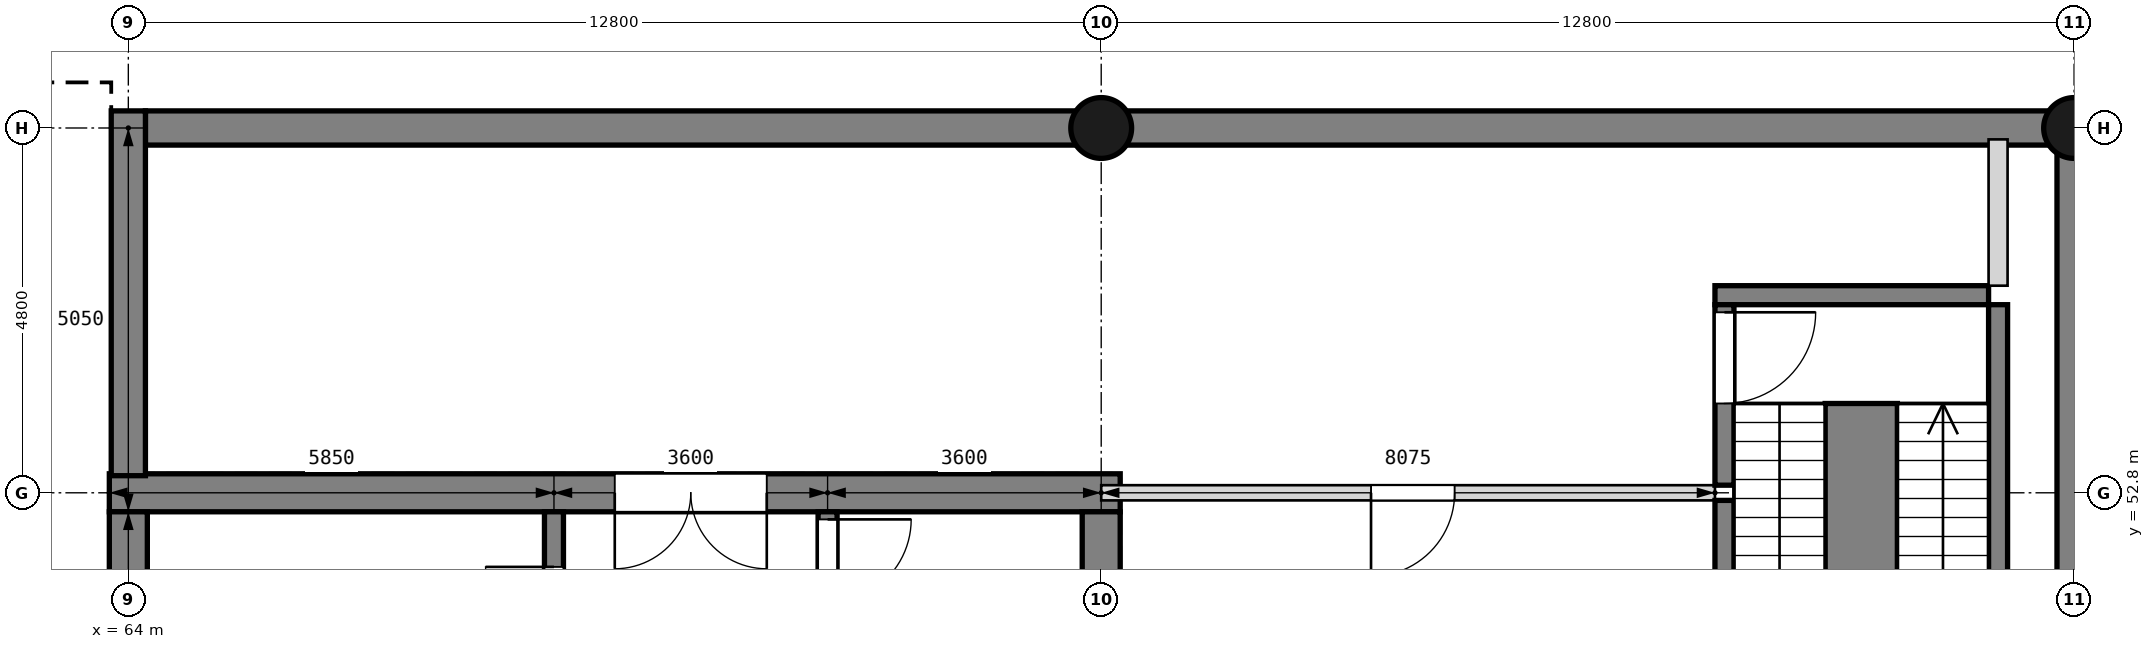
"""IFC4 building model, lengths in metres.
Left out: names, types, materials, properties, quantities, classifications, styles, units other than length and angle.
Written with IfcOpenShell. Run it as: python <this file> out.ifc"""

import sys

from ifc_helpers import new_model, si_unit, direction, frame, frame_2d, origin, origin_2d, place, context, subcontext, project, spatial, rectangle, circle, extrude, element, fill, save


model = new_model("IFC4")
c1 = context("Model", 3, precision=1e-05, world=origin(), true_north=direction((0.0, 1.0)))
c2 = subcontext(c1, "Body", "Model", "MODEL_VIEW")
j1 = project(units=[si_unit("LENGTHUNIT", "METRE"), si_unit("PLANEANGLEUNIT", "RADIAN")], contexts=[c1])
p1 = place(None, origin())
s1 = spatial("IfcSite", under=j1, at=p1, CompositionType="ELEMENT")
p2 = place(p1, origin())
s2 = spatial("IfcBuilding", under=s1, at=p2, CompositionType="ELEMENT")
p3 = place(p2, frame((0.0, 0.0, -4.8)))
s3 = spatial("IfcBuildingStorey", under=s2, at=p3, CompositionType="ELEMENT", Elevation=-4.8)
p4 = place(p3, frame((63.75, 52.8, 0.0), z_axis=(0.0, 0.0, 1.0), x_axis=(1.0, 0.0, 0.0)))
e1 = element("IfcWall", 1, at=p4, inside=s3, PredefinedType="SHEAR", context=c2, shape_type="SweptSolid", body=[
    extrude(rectangle(XDim=13.3, YDim=0.5, at=frame_2d((6.65, 0.0))), origin(), (0.0, 0.0, 1.0), 4.8),
])
p5 = place(p4, frame((6.65, 0.0, 0.0)))
e2 = element("IfcOpeningElement", 2, at=p5, cuts=e1, PredefinedType="OPENING", context=c2, shape_type="SweptSolid", body=[
    extrude(rectangle(XDim=2.0, YDim=2.1, at=frame_2d((1.0, 1.05))), frame((0.0, 0.26, 0.0), z_axis=(0.0, -1.0, 0.0), x_axis=(1.0, 0.0, 0.0)), (0.0, 0.0, 1.0), 0.52),
])
for number, where, z_axis, x_axis in (
    (3, (76.8, 33.85, 0.0), (0.0, 0.0, 1.0), (0.0, 1.0, 0.0)),
    (4, (64.0, 33.85, 0.0), (0.0, 0.0, 1.0), (0.0, 1.0, 0.0)),
):
    element("IfcWall", number, at=place(p3, frame(where, z_axis=z_axis, x_axis=x_axis)), inside=s3, PredefinedType="SHEAR", context=c2, shape_type="SweptSolid", body=[
        extrude(rectangle(XDim=18.7, YDim=0.5, at=frame_2d((9.35, 0.0))), origin(), (0.0, 0.0, 1.0), 4.8),
    ])
p6 = place(p3, frame((89.6, -0.225, 0.0), z_axis=(0.0, 0.0, 1.0), x_axis=(0.0, 1.0, 0.0)))
e5 = element("IfcWall", 5, at=p6, inside=s3, PredefinedType="SOLIDWALL", context=c2, shape_type="SweptSolid", body=[
    extrude(rectangle(XDim=58.05, YDim=0.45, at=frame_2d((29.025, 0.0))), origin(), (0.0, 0.0, 1.0), 4.8),
])
p7 = place(p3, frame((89.375, 57.6, 0.0), z_axis=(0.0, 0.0, 1.0), x_axis=(-1.0, 0.0, 0.0)))
e6 = element("IfcWall", 6, at=p7, inside=s3, PredefinedType="SOLIDWALL", context=c2, shape_type="SweptSolid", body=[
    extrude(rectangle(XDim=25.15, YDim=0.45, at=frame_2d((12.575, 0.0))), origin(), (0.0, 0.0, 1.0), 4.8),
])
p8 = place(p3, frame((64.0, 53.025, 0.0), z_axis=(0.0, 0.0, 1.0), x_axis=(0.0, 1.0, 0.0)))
e7 = element("IfcWall", 7, at=p8, inside=s3, PredefinedType="SOLIDWALL", context=c2, shape_type="SweptSolid", body=[
    extrude(rectangle(XDim=4.8, YDim=0.45, at=frame_2d((2.4, 0.0))), origin(), (0.0, 0.0, 1.0), 4.8),
])
for number, where, z_axis, x_axis in (
    (8, (89.6, 57.6, 0.0), (0.0, 0.0, 1.0), (1.0, 0.0, 0.0)),
    (9, (76.8, 57.6, 0.0), (0.0, 0.0, 1.0), (1.0, 0.0, 0.0)),
):
    element("IfcColumn", number, at=place(p3, frame(where, z_axis=z_axis, x_axis=x_axis)), inside=s3, PredefinedType="COLUMN", context=c2, shape_type="SweptSolid", body=[
        extrude(circle(Radius=0.4, at=origin_2d()), origin(), (0.0, 0.0, 1.0), 4.8),
    ])
p9 = place(p3, frame((73.2, 46.475, 0.0), z_axis=(0.0, 0.0, 1.0), x_axis=(0.0, 1.0, 0.0)))
e10 = element("IfcWall", 10, at=p9, inside=s3, PredefinedType="SOLIDWALL", context=c2, shape_type="SweptSolid", body=[
    extrude(rectangle(XDim=6.075, YDim=0.25, at=frame_2d((3.038, 0.0))), origin(), (0.0, 0.0, 1.0), 4.5),
])
p10 = place(p9, frame((4.875, 0.0, 0.0)))
e11 = element("IfcOpeningElement", 11, at=p10, cuts=e10, PredefinedType="OPENING", context=c2, shape_type="SweptSolid", body=[
    extrude(rectangle(XDim=1.1, YDim=2.1, at=frame_2d((0.55, 1.05))), frame((0.0, 0.135, 0.0), z_axis=(0.0, -1.0, 0.0), x_axis=(1.0, 0.0, 0.0)), (0.0, 0.0, 1.0), 0.27),
])
p11 = place(p3, frame((69.6, 46.475, 0.0), z_axis=(0.0, 0.0, 1.0), x_axis=(0.0, 1.0, 0.0)))
e12 = element("IfcWall", 12, at=p11, inside=s3, PredefinedType="SOLIDWALL", context=c2, shape_type="SweptSolid", body=[
    extrude(rectangle(XDim=6.075, YDim=0.25, at=frame_2d((3.038, 0.0))), origin(), (0.0, 0.0, 1.0), 4.5),
])
p12 = place(p11, frame((1.312, 0.0, 0.0)))
e13 = element("IfcOpeningElement", 13, at=p12, cuts=e12, PredefinedType="OPENING", context=c2, shape_type="SweptSolid", body=[
    extrude(rectangle(XDim=1.0, YDim=2.1, at=frame_2d((0.5, 1.05))), frame((0.0, 0.135, 0.0), z_axis=(0.0, -1.0, 0.0), x_axis=(1.0, 0.0, 0.0)), (0.0, 0.0, 1.0), 0.27),
])
p13 = place(p11, frame((4.45, 0.0, 0.0)))
e14 = element("IfcOpeningElement", 14, at=p13, cuts=e12, PredefinedType="OPENING", context=c2, shape_type="SweptSolid", body=[
    extrude(rectangle(XDim=0.9, YDim=2.1, at=frame_2d((0.45, 1.05))), frame((0.0, 0.135, 0.0), z_axis=(0.0, -1.0, 0.0), x_axis=(1.0, 0.0, 0.0)), (0.0, 0.0, 1.0), 0.27),
])
p14 = place(p3, frame((84.875, 52.8, 0.0), z_axis=(0.0, 0.0, 1.0), x_axis=(-1.0, 0.0, 0.0)))
e15 = element("IfcWall", 15, at=p14, inside=s3, PredefinedType="PARTITIONING", context=c2, shape_type="SweptSolid", body=[
    extrude(rectangle(XDim=8.075, YDim=0.2, at=frame_2d((4.038, 0.0))), origin(), (0.0, 0.0, 1.0), 4.5),
])
p15 = place(p14, frame((3.425, 0.0, 0.0)))
e16 = element("IfcOpeningElement", 16, at=p15, cuts=e15, PredefinedType="OPENING", context=c2, shape_type="SweptSolid", body=[
    extrude(rectangle(XDim=1.1, YDim=2.1, at=frame_2d((0.55, 1.05))), frame((0.0, 0.11, 0.0), z_axis=(0.0, -1.0, 0.0), x_axis=(1.0, 0.0, 0.0)), (0.0, 0.0, 1.0), 0.22),
])
p16 = place(p3, frame((88.475, 55.4, 0.0), z_axis=(0.0, 0.0, 1.0), x_axis=(-1.0, 0.0, 0.0)))
e17 = element("IfcWall", 17, at=p16, inside=s3, PredefinedType="SHEAR", context=c2, shape_type="SweptSolid", body=[
    extrude(rectangle(XDim=3.6, YDim=0.25, at=frame_2d((1.8, 0.0))), origin(), (0.0, 0.0, 1.0), 4.5),
])
p17 = place(p3, frame((88.6, 49.525, 0.0), z_axis=(0.0, 0.0, 1.0), x_axis=(0.0, 1.0, 0.0)))
e18 = element("IfcWall", 18, at=p17, inside=s3, PredefinedType="SHEAR", context=c2, shape_type="SweptSolid", body=[
    extrude(rectangle(XDim=5.75, YDim=0.25, at=frame_2d((2.875, 0.0))), origin(), (0.0, 0.0, 1.0), 4.5),
])
p18 = place(p3, frame((88.6, 55.525, 0.0), z_axis=(0.0, 0.0, 1.0), x_axis=(0.0, 1.0, 0.0)))
e19 = element("IfcWall", 19, at=p18, inside=s3, PredefinedType="PARTITIONING", context=c2, shape_type="SweptSolid", body=[
    extrude(rectangle(XDim=1.925, YDim=0.25, at=frame_2d((0.962, 0.0))), origin(), (0.0, 0.0, 1.0), 4.5),
])
p19 = place(p3, frame((85.0, 49.525, 0.0), z_axis=(0.0, 0.0, 1.0), x_axis=(0.0, 1.0, 0.0)))
e20 = element("IfcWall", 20, at=p19, inside=s3, PredefinedType="SHEAR", context=c2, shape_type="SweptSolid", body=[
    extrude(rectangle(XDim=3.175, YDim=0.25, at=frame_2d((1.587, 0.0))), origin(), (0.0, 0.0, 1.0), 4.5),
])
p20 = place(p3, frame((85.0, 52.9, 0.0), z_axis=(0.0, 0.0, 1.0), x_axis=(0.0, 1.0, 0.0)))
e21 = element("IfcWall", 21, at=p20, inside=s3, PredefinedType="SHEAR", context=c2, shape_type="SweptSolid", body=[
    extrude(rectangle(XDim=2.375, YDim=0.25, at=frame_2d((1.188, 0.0))), origin(), (0.0, 0.0, 1.0), 4.5),
])
p21 = place(p20, frame((1.075, 0.0, 0.0)))
e22 = element("IfcOpeningElement", 22, at=p21, cuts=e21, PredefinedType="OPENING", context=c2, shape_type="SweptSolid", body=[
    extrude(rectangle(XDim=1.2, YDim=2.1, at=frame_2d((0.6, 1.05))), frame((0.0, 0.135, 0.0), z_axis=(0.0, -1.0, 0.0), x_axis=(1.0, 0.0, 0.0)), (0.0, 0.0, 1.0), 0.27),
])
p22 = place(p3, frame((86.8, 53.975, 0.0), z_axis=(0.0, 0.0, 1.0), x_axis=(0.0, -1.0, 0.0)))
e23 = element("IfcWall", 23, at=p22, inside=s3, PredefinedType="SHEAR", context=c2, shape_type="SweptSolid", body=[
    extrude(rectangle(XDim=3.25, YDim=0.95, at=frame_2d((1.625, 0.0))), origin(), (0.0, 0.0, 1.0), 4.8),
])
p23 = place(p10, frame((1.1, 0.0, 0.0), z_axis=(0.0, 0.0, 1.0), x_axis=(-1.0, 0.0, 0.0)))
e24 = element("IfcDoor", 24, at=p23, inside=s3, OperationType="SINGLE_SWING_LEFT", PredefinedType="DOOR", context=c2, shape_type="SweptSolid", body=[
    extrude(rectangle(XDim=1.1, YDim=2.1, at=frame_2d((0.55, 1.05))), frame((0.0, 0.025, 0.0), z_axis=(0.0, -1.0, 0.0), x_axis=(1.0, 0.0, 0.0)), (0.0, 0.0, 1.0), 0.05),
])
fill(e11, e24)
p24 = place(p13, origin())
e25 = element("IfcDoor", 25, at=p24, inside=s3, OperationType="SINGLE_SWING_RIGHT", PredefinedType="DOOR", context=c2, shape_type="SweptSolid", body=[
    extrude(rectangle(XDim=0.9, YDim=2.1, at=frame_2d((0.45, 1.05))), frame((0.0, 0.025, 0.0), z_axis=(0.0, -1.0, 0.0), x_axis=(1.0, 0.0, 0.0)), (0.0, 0.0, 1.0), 0.05),
])
fill(e14, e25)
p25 = place(p5, frame((2.0, 0.0, 0.0), z_axis=(0.0, 0.0, 1.0), x_axis=(-1.0, 0.0, 0.0)))
e26 = element("IfcDoor", 26, at=p25, inside=s3, OperationType="DOUBLE_DOOR_SINGLE_SWING", PredefinedType="DOOR", context=c2, shape_type="SweptSolid", body=[
    extrude(rectangle(XDim=2.0, YDim=2.1, at=frame_2d((1.0, 1.05))), frame((0.0, 0.025, 0.0), z_axis=(0.0, -1.0, 0.0), x_axis=(1.0, 0.0, 0.0)), (0.0, 0.0, 1.0), 0.05),
])
fill(e2, e26)
p26 = place(p15, origin())
e27 = element("IfcDoor", 27, at=p26, inside=s3, OperationType="SINGLE_SWING_RIGHT", PredefinedType="DOOR", context=c2, shape_type="SweptSolid", body=[
    extrude(rectangle(XDim=1.1, YDim=2.1, at=frame_2d((0.55, 1.05))), frame((0.0, 0.025, 0.0), z_axis=(0.0, -1.0, 0.0), x_axis=(1.0, 0.0, 0.0)), (0.0, 0.0, 1.0), 0.05),
])
fill(e16, e27)
p27 = place(p21, frame((1.2, 0.0, 0.0), z_axis=(0.0, 0.0, 1.0), x_axis=(-1.0, 0.0, 0.0)))
e28 = element("IfcDoor", 28, at=p27, inside=s3, OperationType="SINGLE_SWING_LEFT", PredefinedType="DOOR", context=c2, shape_type="SweptSolid", body=[
    extrude(rectangle(XDim=1.2, YDim=2.1, at=frame_2d((0.6, 1.05))), frame((0.0, 0.025, 0.0), z_axis=(0.0, -1.0, 0.0), x_axis=(1.0, 0.0, 0.0)), (0.0, 0.0, 1.0), 0.05),
])
fill(e22, e28)
save(model, sys.argv[1])
